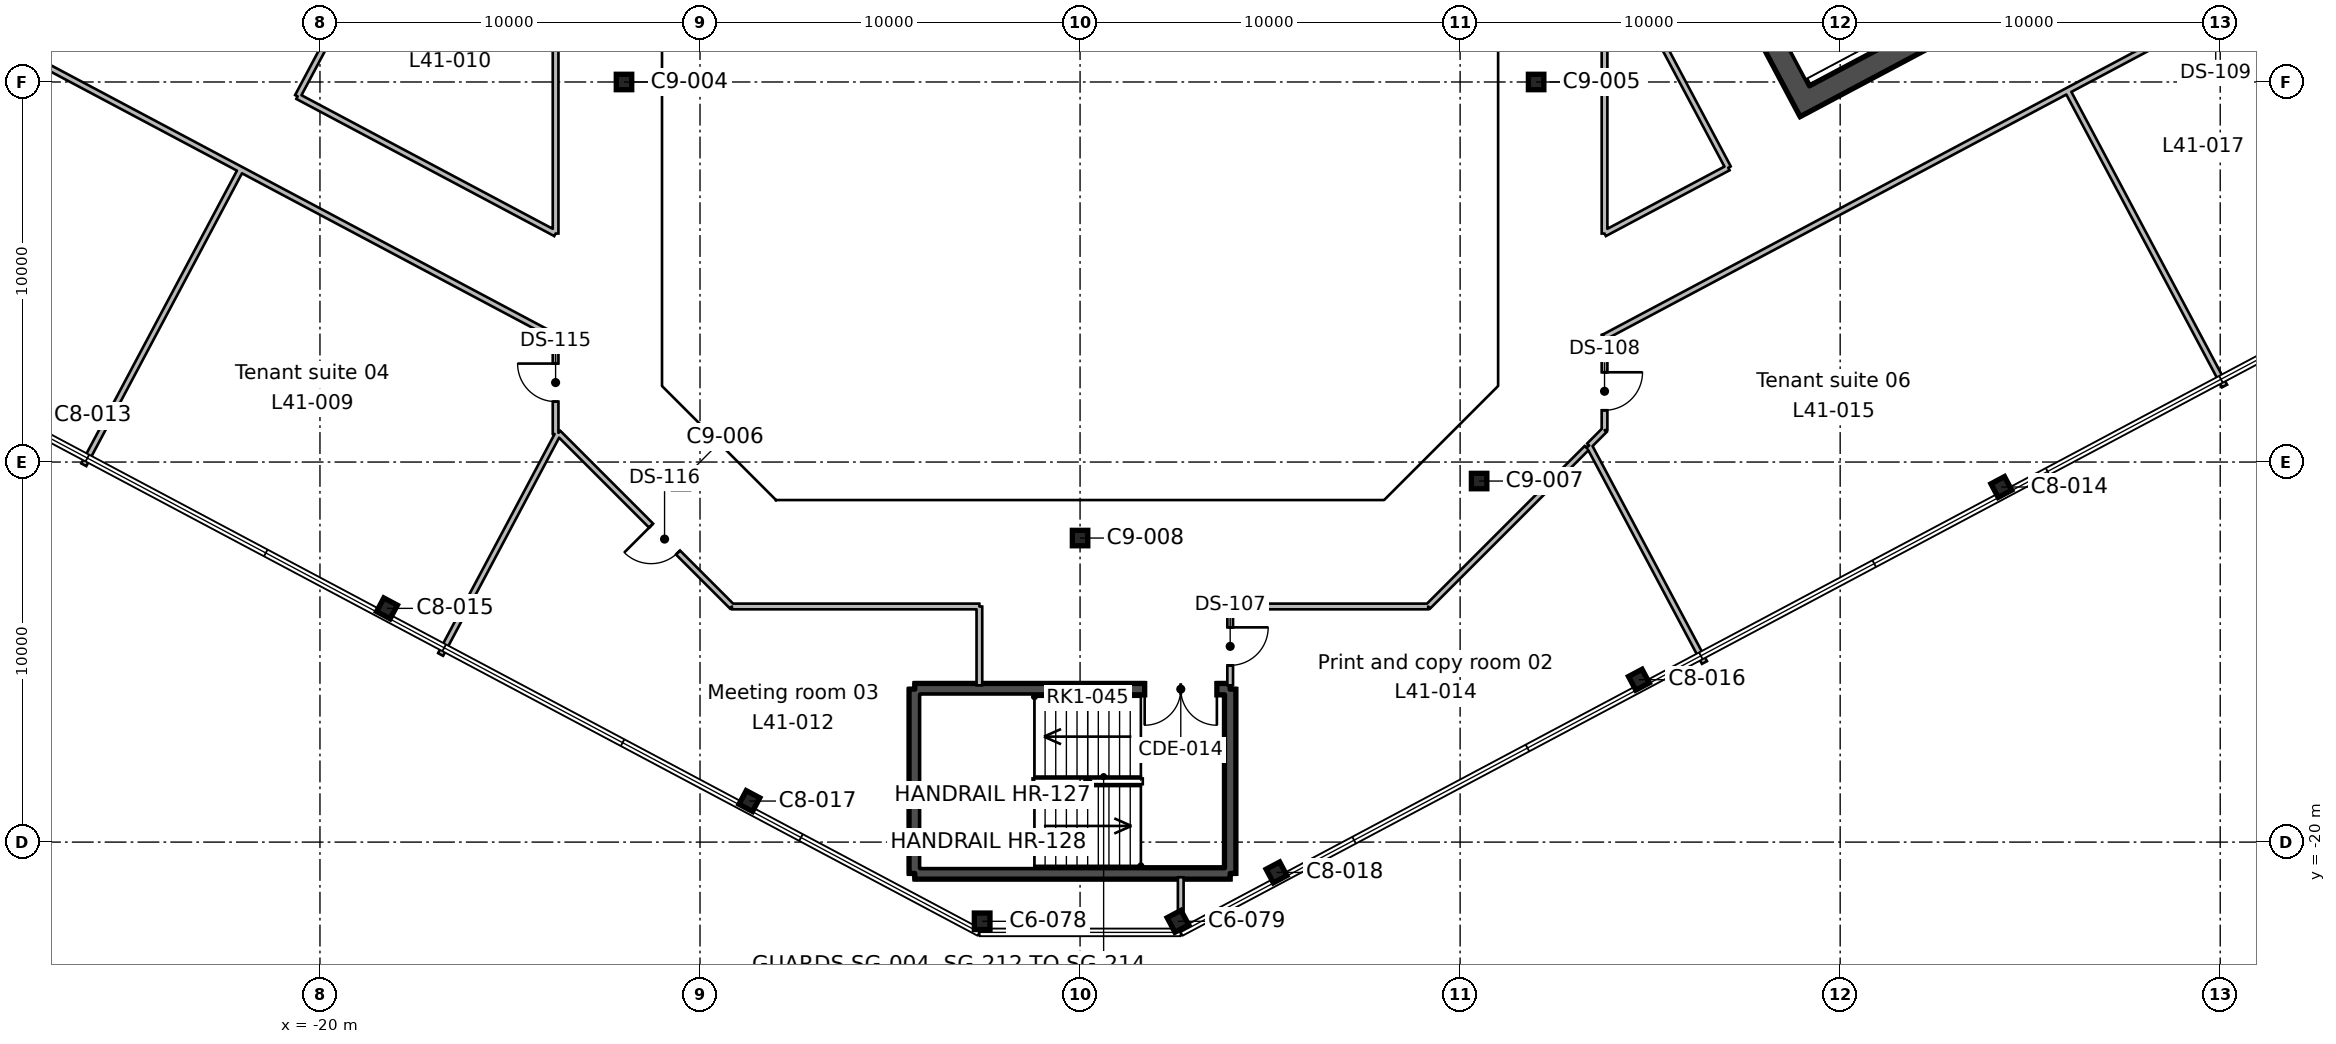
"""IFC4 building model, lengths in metres.
Left out: names, types, materials, properties, quantities, classifications, styles, units other than length and angle.
Written with IfcOpenShell. Run it as: python <this file> out.ifc"""

import sys

from ifc_helpers import new_model, si_unit, direction, frame, frame_2d, origin, origin_2d, place, context, subcontext, project, spatial, rectangle, hollow_rectangle, i_section, extrude, element, fill, save


model = new_model("IFC4")
c1 = context("Model", 3, precision=1e-05, world=origin(), true_north=direction((0.0, 1.0)))
c2 = subcontext(c1, "Body", "Model", "MODEL_VIEW")
j1 = project(units=[si_unit("LENGTHUNIT", "METRE"), si_unit("PLANEANGLEUNIT", "RADIAN")], contexts=[c1])
p1 = place(None, origin())
s1 = spatial("IfcSite", under=j1, at=p1, CompositionType="ELEMENT")
p2 = place(p1, origin())
s2 = spatial("IfcBuilding", under=s1, at=p2, CompositionType="ELEMENT")
p3 = place(p2, frame((0.0, 0.0, 193.5)))
s3 = spatial("IfcBuildingStorey", under=s2, at=p3, CompositionType="ELEMENT", Elevation=193.5)
for number, where, z_axis, x_axis in (
    (1, (-2.576, -22.084, 0.0), (0.0, 0.0, 1.0), (1.0, 0.0, 0.0)),
    (2, (2.576, -22.084, 0.0), (0.0, 0.0, 1.0), (0.883, 0.469, 0.0)),
):
    element("IfcColumn", number, at=place(p3, frame(where, z_axis=z_axis, x_axis=x_axis)), inside=s3, PredefinedType="COLUMN", context=c2, shape_type="SweptSolid", body=[
        extrude(i_section(OverallWidth=0.412, OverallDepth=0.434, WebThickness=0.036, FlangeThickness=0.057, FilletRadius=0.015, at=origin_2d()), origin(), (0.0, 0.0, 1.0), 3.9),
    ])
for number, where, z_axis, x_axis in (
    (3, (5.169, -20.798, 0.0), (0.0, 0.0, 1.0), (0.883, 0.469, 0.0)),
    (4, (-8.701, -18.92, 0.0), (0.0, 0.0, 1.0), (0.883, -0.469, 0.0)),
    (5, (14.705, -15.727, 0.0), (0.0, 0.0, 1.0), (0.883, 0.469, 0.0)),
    (6, (-18.237, -13.85, 0.0), (0.0, 0.0, 1.0), (0.883, -0.469, 0.0)),
):
    element("IfcColumn", number, at=place(p3, frame(where, z_axis=z_axis, x_axis=x_axis)), inside=s3, PredefinedType="COLUMN", context=c2, shape_type="SweptSolid", body=[
        extrude(i_section(OverallWidth=0.404, OverallDepth=0.406, WebThickness=0.027, FlangeThickness=0.044, FilletRadius=0.015, at=origin_2d()), origin(), (0.0, 0.0, 1.0), 3.9),
    ])
p4 = place(p3, frame((0.0, -12.0, 0.0), z_axis=(0.0, 0.0, 1.0), x_axis=(1.0, 0.0, 0.0)))
e7 = element("IfcColumn", 7, at=p4, inside=s3, PredefinedType="COLUMN", context=c2, shape_type="SweptSolid", body=[
    extrude(hollow_rectangle(XDim=0.406, YDim=0.406, WallThickness=0.015, InnerFilletRadius=0.007, OuterFilletRadius=0.022, at=origin_2d()), origin(), (0.0, 0.0, 1.0), 3.9),
])
p5 = place(p3, frame((24.241, -10.657, 0.0), z_axis=(0.0, 0.0, 1.0), x_axis=(0.882947592859, 0.469471562786, 0.0)))
e8 = element("IfcColumn", 8, at=p5, inside=s3, PredefinedType="COLUMN", context=c2, shape_type="SweptSolid", body=[
    extrude(i_section(OverallWidth=0.404, OverallDepth=0.406, WebThickness=0.027, FlangeThickness=0.044, FilletRadius=0.015, at=origin_2d()), origin(), (0.0, 0.0, 1.0), 3.9),
])
for number, where, z_axis, x_axis in (
    (9, (-10.5, -10.5, 0.0), (0.0, 0.0, 1.0), (1.0, 0.0, 0.0)),
    (10, (10.5, -10.5, 0.0), (0.0, 0.0, 1.0), (1.0, 0.0, 0.0)),
    (11, (-12.0, 0.0, 0.0), (0.0, 0.0, 1.0), (1.0, 0.0, 0.0)),
    (12, (12.0, 0.0, 0.0), (0.0, 0.0, 1.0), (1.0, 0.0, 0.0)),
):
    element("IfcColumn", number, at=place(p3, frame(where, z_axis=z_axis, x_axis=x_axis)), inside=s3, PredefinedType="COLUMN", context=c2, shape_type="SweptSolid", body=[
        extrude(hollow_rectangle(XDim=0.406, YDim=0.406, WallThickness=0.015, InnerFilletRadius=0.007, OuterFilletRadius=0.022, at=origin_2d()), origin(), (0.0, 0.0, 1.0), 3.9),
    ])
p6 = place(p3, frame((19.211, -0.771, 0.0), z_axis=(0.0, 0.0, 1.0), x_axis=(-0.469463742137, 0.882951751127, 0.0)))
e13 = element("IfcWall", 13, at=p6, inside=s3, PredefinedType="SHEAR", context=c2, shape_type="SweptSolid", body=[
    extrude(rectangle(XDim=19.4, YDim=0.6, at=frame_2d((9.7, 0.0))), origin(), (0.0, 0.0, 1.0), 3.9),
])
p7 = place(p6, frame((6.7, 0.0, 0.0)))
e14 = element("IfcOpeningElement", 14, at=p7, cuts=e13, PredefinedType="OPENING", context=c2, shape_type="SweptSolid", body=[
    extrude(rectangle(XDim=2.4, YDim=2.4, at=frame_2d((1.2, 1.2))), frame((0.0, 0.31, 0.0), z_axis=(0.0, -1.0, 0.0), x_axis=(1.0, 0.0, 0.0)), (0.0, 0.0, 1.0), 0.62),
])
p8 = place(p3, frame((19.335, -0.366, 0.0), z_axis=(0.0, 0.0, 1.0), x_axis=(0.88294509198, 0.469476266226, 0.0)))
e15 = element("IfcWall", 15, at=p8, inside=s3, PredefinedType="SHEAR", context=c2, shape_type="SweptSolid", body=[
    extrude(rectangle(XDim=20.2, YDim=0.6, at=frame_2d((10.1, 0.0))), origin(), (0.0, 0.0, 1.0), 3.9),
])
p9 = place(p3, frame((3.95, -15.975, 0.0), z_axis=(0.0, 0.0, 1.0), x_axis=(0.0, -1.0, 0.0)))
e16 = element("IfcWall", 16, at=p9, inside=s3, PredefinedType="SHEAR", context=c2, shape_type="SweptSolid", body=[
    extrude(rectangle(XDim=4.85, YDim=0.3, at=frame_2d((2.425, 0.0))), origin(), (0.0, 0.0, 1.0), 3.9),
])
p10 = place(p3, frame((3.95, -20.825, 0.0), z_axis=(0.0, 0.0, 1.0), x_axis=(-1.0, 0.0, 0.0)))
e17 = element("IfcWall", 17, at=p10, inside=s3, PredefinedType="SHEAR", context=c2, shape_type="SweptSolid", body=[
    extrude(rectangle(XDim=8.3, YDim=0.3, at=frame_2d((4.15, 0.0))), origin(), (0.0, 0.0, 1.0), 3.9),
])
p11 = place(p3, frame((-4.35, -20.825, 0.0), z_axis=(0.0, 0.0, 1.0), x_axis=(0.0, 1.0, 0.0)))
e18 = element("IfcWall", 18, at=p11, inside=s3, PredefinedType="SHEAR", context=c2, shape_type="SweptSolid", body=[
    extrude(rectangle(XDim=4.85, YDim=0.3, at=frame_2d((2.425, 0.0))), origin(), (0.0, 0.0, 1.0), 3.9),
])
p12 = place(p3, frame((-4.35, -15.975, 0.0), z_axis=(0.0, 0.0, 1.0), x_axis=(1.0, 0.0, 0.0)))
e19 = element("IfcWall", 19, at=p12, inside=s3, PredefinedType="SHEAR", context=c2, shape_type="SweptSolid", body=[
    extrude(rectangle(XDim=8.3, YDim=0.3, at=frame_2d((4.15, 0.0))), origin(), (0.0, 0.0, 1.0), 3.9),
])
p13 = place(p12, frame((6.05, 0.0, 0.0)))
e20 = element("IfcOpeningElement", 20, at=p13, cuts=e19, PredefinedType="OPENING", context=c2, shape_type="SweptSolid", body=[
    extrude(rectangle(XDim=1.9, YDim=2.1, at=frame_2d((0.95, 1.05))), frame((0.0, 0.16, 0.0), z_axis=(0.0, -1.0, 0.0), x_axis=(1.0, 0.0, 0.0)), (0.0, 0.0, 1.0), 0.32),
])
p14 = place(p3, frame((-22.083, -2.302, 0.0), z_axis=(0.0, 0.0, 1.0), x_axis=(-0.469445946219, -0.882961212952, 0.0)))
e21 = element("IfcWall", 21, at=p14, inside=s3, PredefinedType="PARTITIONING", context=c2, shape_type="SweptSolid", body=[
    extrude(rectangle(XDim=8.8, YDim=0.15, at=frame_2d((4.4, 0.0))), origin(), (0.0, 0.0, 1.0), 3.54),
])
p15 = place(p3, frame((-13.8, -9.263, 0.0), z_axis=(0.0, 0.0, 1.0), x_axis=(0.0, 1.0, 0.0)))
e22 = element("IfcWall", 22, at=p15, inside=s3, PredefinedType="PARTITIONING", context=c2, shape_type="SweptSolid", body=[
    extrude(rectangle(XDim=2.557, YDim=0.15, at=frame_2d((1.278, 0.0))), origin(), (0.0, 0.0, 1.0), 3.54),
])
p16 = place(p15, frame((0.854, 0.0, 0.0)))
e23 = element("IfcOpeningElement", 23, at=p16, cuts=e22, PredefinedType="OPENING", context=c2, shape_type="SweptSolid", body=[
    extrude(rectangle(XDim=1.0, YDim=2.1, at=frame_2d((0.5, 1.05))), frame((0.0, 0.085, 0.0), z_axis=(0.0, -1.0, 0.0), x_axis=(1.0, 0.0, 0.0)), (0.0, 0.0, 1.0), 0.17),
])
p17 = place(p3, frame((-13.8, -6.706, 0.0), z_axis=(0.0, 0.0, 1.0), x_axis=(-0.882947286887, 0.469472138235, 0.0)))
e24 = element("IfcWall", 24, at=p17, inside=s3, PredefinedType="PARTITIONING", context=c2, shape_type="SweptSolid", body=[
    extrude(rectangle(XDim=36.571, YDim=0.15, at=frame_2d((18.285, 0.0))), origin(), (0.0, 0.0, 1.0), 3.54),
])
p18 = place(p17, frame((34.15, 0.0, 0.0)))
e25 = element("IfcOpeningElement", 25, at=p18, cuts=e24, PredefinedType="OPENING", context=c2, shape_type="SweptSolid", body=[
    extrude(rectangle(XDim=1.0, YDim=2.1, at=frame_2d((0.5, 1.05))), frame((0.0, 0.085, 0.0), z_axis=(0.0, -1.0, 0.0), x_axis=(1.0, 0.0, 0.0)), (0.0, 0.0, 1.0), 0.17),
])
p19 = place(p17, frame((17.35, 0.0, 0.0)))
e26 = element("IfcOpeningElement", 26, at=p19, cuts=e24, PredefinedType="OPENING", context=c2, shape_type="SweptSolid", body=[
    extrude(rectangle(XDim=1.8, YDim=2.1, at=frame_2d((0.9, 1.05))), frame((0.0, 0.085, 0.0), z_axis=(0.0, -1.0, 0.0), x_axis=(1.0, 0.0, 0.0)), (0.0, 0.0, 1.0), 0.17),
])
p20 = place(p3, frame((-13.726, -9.234, 0.0), z_axis=(0.0, 0.0, 1.0), x_axis=(-0.469465185833, -0.882950983515, 0.0)))
e27 = element("IfcWall", 27, at=p20, inside=s3, PredefinedType="PARTITIONING", context=c2, shape_type="SweptSolid", body=[
    extrude(rectangle(XDim=6.603, YDim=0.15, at=frame_2d((3.302, 0.0))), origin(), (0.0, 0.0, 1.0), 3.54),
])
p21 = place(p3, frame((-13.726, -9.234, 0.0), z_axis=(0.0, 0.0, 1.0), x_axis=(0.707106781187, -0.707106781187, 0.0)))
e28 = element("IfcWall", 28, at=p21, inside=s3, PredefinedType="PARTITIONING", context=c2, shape_type="SweptSolid", body=[
    extrude(rectangle(XDim=6.458, YDim=0.15, at=frame_2d((3.229, 0.0))), origin(), (0.0, 0.0, 1.0), 3.54),
])
p22 = place(p21, frame((3.45, 0.0, 0.0)))
e29 = element("IfcOpeningElement", 29, at=p22, cuts=e28, PredefinedType="OPENING", context=c2, shape_type="SweptSolid", body=[
    extrude(rectangle(XDim=1.0, YDim=2.1, at=frame_2d((0.5, 1.05))), frame((0.0, 0.085, 0.0), z_axis=(0.0, -1.0, 0.0), x_axis=(1.0, 0.0, 0.0)), (0.0, 0.0, 1.0), 0.17),
])
p23 = place(p3, frame((-2.649, -15.875, 0.0), z_axis=(0.0, 0.0, 1.0), x_axis=(0.0, 1.0, 0.0)))
e30 = element("IfcWall", 30, at=p23, inside=s3, PredefinedType="PARTITIONING", context=c2, shape_type="SweptSolid", body=[
    extrude(rectangle(XDim=2.075, YDim=0.15, at=frame_2d((1.038, 0.0))), origin(), (0.0, 0.0, 1.0), 3.54),
])
p24 = place(p3, frame((-2.649, -13.8, 0.0), z_axis=(0.0, 0.0, 1.0), x_axis=(-1.0, 0.0, 0.0)))
e31 = element("IfcWall", 31, at=p24, inside=s3, PredefinedType="PARTITIONING", context=c2, shape_type="SweptSolid", body=[
    extrude(rectangle(XDim=6.511, YDim=0.15, at=frame_2d((3.255, 0.0))), origin(), (0.0, 0.0, 1.0), 3.54),
])
p25 = place(p3, frame((2.649, -21.799, 0.0), z_axis=(0.0, 0.0, 1.0), x_axis=(0.0, 1.0, 0.0)))
e32 = element("IfcWall", 32, at=p25, inside=s3, PredefinedType="PARTITIONING", context=c2, shape_type="SweptSolid", body=[
    extrude(rectangle(XDim=0.874, YDim=0.15, at=frame_2d((0.437, 0.0))), origin(), (0.0, 0.0, 1.0), 3.54),
])
p26 = place(p3, frame((3.95, -13.8, 0.0), z_axis=(0.0, 0.0, 1.0), x_axis=(0.0, -1.0, 0.0)))
e33 = element("IfcWall", 33, at=p26, inside=s3, PredefinedType="PARTITIONING", context=c2, shape_type="SweptSolid", body=[
    extrude(rectangle(XDim=2.075, YDim=0.15, at=frame_2d((1.038, 0.0))), origin(), (0.0, 0.0, 1.0), 3.54),
])
p27 = place(p26, frame((0.55, 0.0, 0.0)))
e34 = element("IfcOpeningElement", 34, at=p27, cuts=e33, PredefinedType="OPENING", context=c2, shape_type="SweptSolid", body=[
    extrude(rectangle(XDim=1.0, YDim=2.1, at=frame_2d((0.5, 1.05))), frame((0.0, 0.085, 0.0), z_axis=(0.0, -1.0, 0.0), x_axis=(1.0, 0.0, 0.0)), (0.0, 0.0, 1.0), 0.17),
])
p28 = place(p3, frame((13.331, -9.629, 0.0), z_axis=(0.0, 0.0, 1.0), x_axis=(-0.707106781187, -0.707106781187, 0.0)))
e35 = element("IfcWall", 35, at=p28, inside=s3, PredefinedType="PARTITIONING", context=c2, shape_type="SweptSolid", body=[
    extrude(rectangle(XDim=5.899, YDim=0.15, at=frame_2d((2.949, 0.0))), origin(), (0.0, 0.0, 1.0), 3.54),
])
p29 = place(p3, frame((9.16, -13.8, 0.0), z_axis=(0.0, 0.0, 1.0), x_axis=(-1.0, 0.0, 0.0)))
e36 = element("IfcWall", 36, at=p29, inside=s3, PredefinedType="PARTITIONING", context=c2, shape_type="SweptSolid", body=[
    extrude(rectangle(XDim=5.135, YDim=0.15, at=frame_2d((2.567, 0.0))), origin(), (0.0, 0.0, 1.0), 3.54),
])
p30 = place(p3, frame((13.393, -9.567, 0.0), z_axis=(0.0, 0.0, 1.0), x_axis=(0.469578527863, -0.882890710207, 0.0)))
e37 = element("IfcWall", 37, at=p30, inside=s3, PredefinedType="PARTITIONING", context=c2, shape_type="SweptSolid", body=[
    extrude(rectangle(XDim=6.465, YDim=0.15, at=frame_2d((3.232, 0.0))), origin(), (0.0, 0.0, 1.0), 3.54),
])
p31 = place(p3, frame((13.8, -6.656, 0.0), z_axis=(0.0, 0.0, 1.0), x_axis=(0.0, -1.0, 0.0)))
e38 = element("IfcWall", 38, at=p31, inside=s3, PredefinedType="PARTITIONING", context=c2, shape_type="SweptSolid", body=[
    extrude(rectangle(XDim=2.504, YDim=0.15, at=frame_2d((1.252, 0.0))), origin(), (0.0, 0.0, 1.0), 3.54),
])
p32 = place(p31, frame((0.982, 0.0, 0.0)))
e39 = element("IfcOpeningElement", 39, at=p32, cuts=e38, PredefinedType="OPENING", context=c2, shape_type="SweptSolid", body=[
    extrude(rectangle(XDim=1.0, YDim=2.1, at=frame_2d((0.5, 1.05))), frame((0.0, 0.085, 0.0), z_axis=(0.0, -1.0, 0.0), x_axis=(1.0, 0.0, 0.0)), (0.0, 0.0, 1.0), 0.17),
])
p33 = place(p3, frame((13.395, -9.565, 0.0), z_axis=(0.0, 0.0, 1.0), x_axis=(0.706254846232, 0.707957690949, 0.0)))
e40 = element("IfcWall", 40, at=p33, inside=s3, PredefinedType="PARTITIONING", context=c2, shape_type="SweptSolid", body=[
    extrude(rectangle(XDim=0.573, YDim=0.15, at=frame_2d((0.287, 0.0))), origin(), (0.0, 0.0, 1.0), 3.54),
])
p34 = place(p3, frame((25.982, -0.229, 0.0), z_axis=(0.0, 0.0, 1.0), x_axis=(0.469445946219, -0.882961212952, 0.0)))
e41 = element("IfcWall", 41, at=p34, inside=s3, PredefinedType="PARTITIONING", context=c2, shape_type="SweptSolid", body=[
    extrude(rectangle(XDim=8.8, YDim=0.15, at=frame_2d((4.4, 0.0))), origin(), (0.0, 0.0, 1.0), 3.54),
])
p35 = place(p3, frame((48.38, 11.679, 0.0), z_axis=(0.0, 0.0, 1.0), x_axis=(-0.882962559816, -0.469443412951, 0.0)))
e42 = element("IfcWall", 42, at=p35, inside=s3, PredefinedType="PARTITIONING", context=c2, shape_type="SweptSolid", body=[
    extrude(rectangle(XDim=39.163, YDim=0.15, at=frame_2d((19.582, 0.0))), origin(), (0.0, 0.0, 1.0), 3.54),
])
p36 = place(p35, frame((20.45, 0.0, 0.0)))
e43 = element("IfcOpeningElement", 43, at=p36, cuts=e42, PredefinedType="OPENING", context=c2, shape_type="SweptSolid", body=[
    extrude(rectangle(XDim=1.0, YDim=2.1, at=frame_2d((0.5, 1.05))), frame((0.0, 0.085, 0.0), z_axis=(0.0, -1.0, 0.0), x_axis=(1.0, 0.0, 0.0)), (0.0, 0.0, 1.0), 0.17),
])
p37 = place(p35, frame((18.75, 0.0, 0.0)))
e44 = element("IfcOpeningElement", 44, at=p37, cuts=e42, PredefinedType="OPENING", context=c2, shape_type="SweptSolid", body=[
    extrude(rectangle(XDim=1.0, YDim=2.1, at=frame_2d((0.5, 1.05))), frame((0.0, 0.085, 0.0), z_axis=(0.0, -1.0, 0.0), x_axis=(1.0, 0.0, 0.0)), (0.0, 0.0, 1.0), 0.17),
])
p38 = place(p3, frame((30.544, 2.197, 0.0), z_axis=(0.0, 0.0, 1.0), x_axis=(0.469518415739, -0.882922679107, 0.0)))
e45 = element("IfcWall", 45, at=p38, inside=s3, PredefinedType="PARTITIONING", context=c2, shape_type="SweptSolid", body=[
    extrude(rectangle(XDim=4.882, YDim=0.15, at=frame_2d((2.441, 0.0))), origin(), (0.0, 0.0, 1.0), 3.54),
])
p39 = place(p3, frame((-20.588, -0.379, 0.0), z_axis=(0.0, 0.0, 1.0), x_axis=(0.469489882812, 0.882937851685, 0.0)))
e46 = element("IfcWall", 46, at=p39, inside=s3, PredefinedType="PARTITIONING", context=c2, shape_type="SweptSolid", body=[
    extrude(rectangle(XDim=20.0, YDim=0.15, at=frame_2d((10.0, 0.0))), origin(), (0.0, 0.0, 1.0), 3.54),
])
p40 = place(p39, frame((9.55, 0.0, 0.0)))
e47 = element("IfcOpeningElement", 47, at=p40, cuts=e46, PredefinedType="OPENING", context=c2, shape_type="SweptSolid", body=[
    extrude(rectangle(XDim=1.0, YDim=2.1, at=frame_2d((0.5, 1.05))), frame((0.0, 0.085, 0.0), z_axis=(0.0, -1.0, 0.0), x_axis=(1.0, 0.0, 0.0)), (0.0, 0.0, 1.0), 0.17),
])
p41 = place(p3, frame((-13.8, 9.16, 0.0), z_axis=(0.0, 0.0, 1.0), x_axis=(0.0, -1.0, 0.0)))
e48 = element("IfcWall", 48, at=p41, inside=s3, PredefinedType="PARTITIONING", context=c2, shape_type="SweptSolid", body=[
    extrude(rectangle(XDim=13.148, YDim=0.15, at=frame_2d((6.574, 0.0))), origin(), (0.0, 0.0, 1.0), 3.54),
])
p42 = place(p3, frame((-13.8, -3.988, 0.0), z_axis=(0.0, 0.0, 1.0), x_axis=(-0.882949137368, 0.469468657976, 0.0)))
e49 = element("IfcWall", 49, at=p42, inside=s3, PredefinedType="PARTITIONING", context=c2, shape_type="SweptSolid", body=[
    extrude(rectangle(XDim=7.688, YDim=0.15, at=frame_2d((3.844, 0.0))), origin(), (0.0, 0.0, 1.0), 3.54),
])
p43 = place(p3, frame((17.056, -2.257, 0.0), z_axis=(0.0, 0.0, 1.0), x_axis=(-0.469433160251, 0.882968010778, 0.0)))
e50 = element("IfcWall", 50, at=p43, inside=s3, PredefinedType="PARTITIONING", context=c2, shape_type="SweptSolid", body=[
    extrude(rectangle(XDim=6.936, YDim=0.15, at=frame_2d((3.468, 0.0))), origin(), (0.0, 0.0, 1.0), 3.54),
])
p44 = place(p3, frame((13.8, 3.867, 0.0), z_axis=(0.0, 0.0, 1.0), x_axis=(0.0, -1.0, 0.0)))
e51 = element("IfcWall", 51, at=p44, inside=s3, PredefinedType="PARTITIONING", context=c2, shape_type="SweptSolid", body=[
    extrude(rectangle(XDim=7.855, YDim=0.15, at=frame_2d((3.927, 0.0))), origin(), (0.0, 0.0, 1.0), 3.54),
])
p45 = place(p3, frame((13.8, -3.988, 0.0), z_axis=(0.0, 0.0, 1.0), x_axis=(0.882971660552, 0.469426295239, 0.0)))
e52 = element("IfcWall", 52, at=p45, inside=s3, PredefinedType="PARTITIONING", context=c2, shape_type="SweptSolid", body=[
    extrude(rectangle(XDim=3.688, YDim=0.15, at=frame_2d((1.844, 0.0))), origin(), (0.0, 0.0, 1.0), 3.54),
])
p46 = place(p13, frame((1.9, 0.0, 0.0), z_axis=(0.0, 0.0, 1.0), x_axis=(-1.0, 0.0, 0.0)))
e53 = element("IfcDoor", 53, at=p46, inside=s3, OperationType="DOUBLE_DOOR_SINGLE_SWING", PredefinedType="DOOR", context=c2, shape_type="SweptSolid", body=[
    extrude(rectangle(XDim=1.9, YDim=2.1, at=frame_2d((0.95, 1.05))), frame((0.0, 0.025, 0.0), z_axis=(0.0, -1.0, 0.0), x_axis=(1.0, 0.0, 0.0)), (0.0, 0.0, 1.0), 0.05),
])
fill(e20, e53)
p47 = place(p27, origin())
e54 = element("IfcDoor", 54, at=p47, inside=s3, OperationType="SINGLE_SWING_LEFT", PredefinedType="DOOR", context=c2, shape_type="SweptSolid", body=[
    extrude(rectangle(XDim=1.0, YDim=2.1, at=frame_2d((0.5, 1.05))), frame((0.0, 0.025, 0.0), z_axis=(0.0, -1.0, 0.0), x_axis=(1.0, 0.0, 0.0)), (0.0, 0.0, 1.0), 0.05),
])
fill(e34, e54)
p48 = place(p32, origin())
e55 = element("IfcDoor", 55, at=p48, inside=s3, OperationType="SINGLE_SWING_LEFT", PredefinedType="DOOR", context=c2, shape_type="SweptSolid", body=[
    extrude(rectangle(XDim=1.0, YDim=2.1, at=frame_2d((0.5, 1.05))), frame((0.0, 0.025, 0.0), z_axis=(0.0, -1.0, 0.0), x_axis=(1.0, 0.0, 0.0)), (0.0, 0.0, 1.0), 0.05),
])
fill(e39, e55)
p49 = place(p16, origin())
e56 = element("IfcDoor", 56, at=p49, inside=s3, OperationType="SINGLE_SWING_RIGHT", PredefinedType="DOOR", context=c2, shape_type="SweptSolid", body=[
    extrude(rectangle(XDim=1.0, YDim=2.1, at=frame_2d((0.5, 1.05))), frame((0.0, 0.025, 0.0), z_axis=(0.0, -1.0, 0.0), x_axis=(1.0, 0.0, 0.0)), (0.0, 0.0, 1.0), 0.05),
])
fill(e23, e56)
p50 = place(p22, frame((1.0, 0.0, 0.0), z_axis=(0.0, 0.0, 1.0), x_axis=(-1.0, 0.0, 0.0)))
e57 = element("IfcDoor", 57, at=p50, inside=s3, OperationType="SINGLE_SWING_RIGHT", PredefinedType="DOOR", context=c2, shape_type="SweptSolid", body=[
    extrude(rectangle(XDim=1.0, YDim=2.1, at=frame_2d((0.5, 1.05))), frame((0.0, 0.025, 0.0), z_axis=(0.0, -1.0, 0.0), x_axis=(1.0, 0.0, 0.0)), (0.0, 0.0, 1.0), 0.05),
])
fill(e29, e57)
save(model, sys.argv[1])
